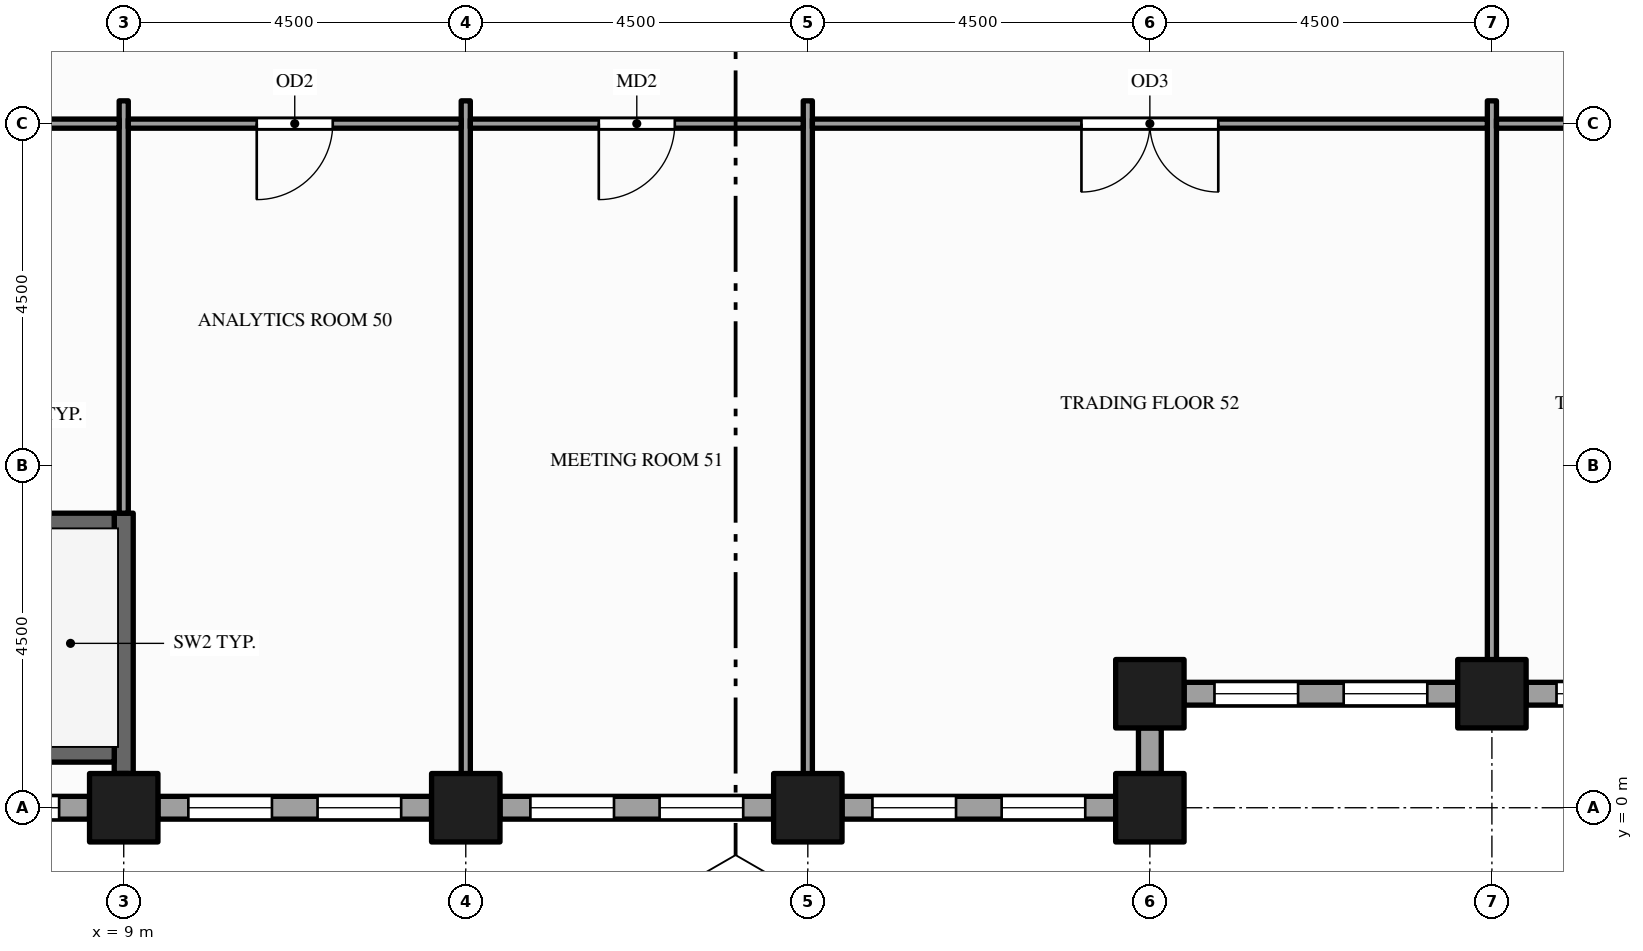
"""IFC4 building model, lengths in metres.
Left out: names, types, materials, properties, quantities, classifications, styles, units other than length and angle.
Written with IfcOpenShell. Run it as: python <this file> out.ifc"""

import sys

from ifc_helpers import new_model, si_unit, direction, frame, frame_2d, origin, origin_2d, place, context, subcontext, project, spatial, rectangle, hollow_rectangle, extrude, element, fill, save


model = new_model("IFC4")
c1 = context("Model", 3, precision=1e-05, world=origin(), true_north=direction((0.0, 1.0)))
c2 = subcontext(c1, "Body", "Model", "MODEL_VIEW")
j1 = project(units=[si_unit("LENGTHUNIT", "METRE"), si_unit("PLANEANGLEUNIT", "RADIAN")], contexts=[c1])
p1 = place(None, origin())
s1 = spatial("IfcSite", under=j1, at=p1, CompositionType="ELEMENT")
p2 = place(p1, origin())
s2 = spatial("IfcBuilding", under=s1, at=p2, CompositionType="ELEMENT")
p3 = place(p2, frame((0.0, 0.0, 143.0)))
s3 = spatial("IfcBuildingStorey", under=s2, at=p3, CompositionType="ELEMENT", Elevation=143.0)
for number, where, z_axis, x_axis in (
    (1, (9.0, 0.0, -0.15), (0.0, 0.0, 1.0), (1.0, 0.0, 0.0)),
    (2, (13.5, 0.0, -0.15), (0.0, 0.0, 1.0), (1.0, 0.0, 0.0)),
    (3, (18.0, 0.0, -0.15), (0.0, 0.0, 1.0), (1.0, 0.0, 0.0)),
    (4, (22.5, 0.0, -0.15), (0.0, 0.0, 1.0), (1.0, 0.0, 0.0)),
    (5, (22.5, 1.5, -0.15), (0.0, 0.0, 1.0), (1.0, 0.0, 0.0)),
    (6, (27.0, 1.5, -0.15), (0.0, 0.0, 1.0), (1.0, 0.0, 0.0)),
):
    element("IfcColumn", number, at=place(p3, frame(where, z_axis=z_axis, x_axis=x_axis)), inside=s3, PredefinedType="COLUMN", context=c2, shape_type="SweptSolid", body=[
        extrude(hollow_rectangle(XDim=0.9, YDim=0.9, WallThickness=0.045, at=origin_2d()), origin(), (0.0, 0.0, 1.0), 4.0),
    ])
p4 = place(p3, frame((4.95, 0.0, 0.0), z_axis=(0.0, 0.0, 1.0), x_axis=(1.0, 0.0, 0.0)))
e7 = element("IfcWall", 7, at=p4, inside=s3, PredefinedType="STANDARD", context=c2, shape_type="SweptSolid", body=[
    extrude(rectangle(XDim=3.6, YDim=0.3, at=frame_2d((1.8, 0.0))), origin(), (0.0, 0.0, 1.0), 3.149),
])
p5 = place(p4, frame((0.4, 0.0, 0.9)))
e8 = element("IfcOpeningElement", 8, at=p5, cuts=e7, PredefinedType="OPENING", context=c2, shape_type="SweptSolid", body=[
    extrude(rectangle(XDim=1.1, YDim=2.0, at=frame_2d((0.55, 1.0))), frame((0.0, 0.16, 0.0), z_axis=(0.0, -1.0, 0.0), x_axis=(1.0, 0.0, 0.0)), (0.0, 0.0, 1.0), 0.32),
])
p6 = place(p4, frame((2.1, 0.0, 0.9)))
e9 = element("IfcOpeningElement", 9, at=p6, cuts=e7, PredefinedType="OPENING", context=c2, shape_type="SweptSolid", body=[
    extrude(rectangle(XDim=1.1, YDim=2.0, at=frame_2d((0.55, 1.0))), frame((0.0, 0.16, 0.0), z_axis=(0.0, -1.0, 0.0), x_axis=(1.0, 0.0, 0.0)), (0.0, 0.0, 1.0), 0.32),
])
p7 = place(p3, frame((9.45, 0.0, 0.0), z_axis=(0.0, 0.0, 1.0), x_axis=(1.0, 0.0, 0.0)))
e10 = element("IfcWall", 10, at=p7, inside=s3, PredefinedType="STANDARD", context=c2, shape_type="SweptSolid", body=[
    extrude(rectangle(XDim=3.6, YDim=0.3, at=frame_2d((1.8, 0.0))), origin(), (0.0, 0.0, 1.0), 2.87),
])
p8 = place(p7, frame((0.4, 0.0, 0.9)))
e11 = element("IfcOpeningElement", 11, at=p8, cuts=e10, PredefinedType="OPENING", context=c2, shape_type="SweptSolid", body=[
    extrude(rectangle(XDim=1.1, YDim=1.75, at=frame_2d((0.55, 0.875))), frame((0.0, 0.16, 0.0), z_axis=(0.0, -1.0, 0.0), x_axis=(1.0, 0.0, 0.0)), (0.0, 0.0, 1.0), 0.32),
])
p9 = place(p7, frame((2.1, 0.0, 0.9)))
e12 = element("IfcOpeningElement", 12, at=p9, cuts=e10, PredefinedType="OPENING", context=c2, shape_type="SweptSolid", body=[
    extrude(rectangle(XDim=1.1, YDim=1.75, at=frame_2d((0.55, 0.875))), frame((0.0, 0.16, 0.0), z_axis=(0.0, -1.0, 0.0), x_axis=(1.0, 0.0, 0.0)), (0.0, 0.0, 1.0), 0.32),
])
p10 = place(p3, frame((13.95, 0.0, 0.0), z_axis=(0.0, 0.0, 1.0), x_axis=(1.0, 0.0, 0.0)))
e13 = element("IfcWall", 13, at=p10, inside=s3, PredefinedType="STANDARD", context=c2, shape_type="SweptSolid", body=[
    extrude(rectangle(XDim=3.6, YDim=0.3, at=frame_2d((1.8, 0.0))), origin(), (0.0, 0.0, 1.0), 2.87),
])
p11 = place(p10, frame((0.4, 0.0, 0.9)))
e14 = element("IfcOpeningElement", 14, at=p11, cuts=e13, PredefinedType="OPENING", context=c2, shape_type="SweptSolid", body=[
    extrude(rectangle(XDim=1.1, YDim=1.75, at=frame_2d((0.55, 0.875))), frame((0.0, 0.16, 0.0), z_axis=(0.0, -1.0, 0.0), x_axis=(1.0, 0.0, 0.0)), (0.0, 0.0, 1.0), 0.32),
])
p12 = place(p10, frame((2.1, 0.0, 0.9)))
e15 = element("IfcOpeningElement", 15, at=p12, cuts=e13, PredefinedType="OPENING", context=c2, shape_type="SweptSolid", body=[
    extrude(rectangle(XDim=1.1, YDim=1.75, at=frame_2d((0.55, 0.875))), frame((0.0, 0.16, 0.0), z_axis=(0.0, -1.0, 0.0), x_axis=(1.0, 0.0, 0.0)), (0.0, 0.0, 1.0), 0.32),
])
p13 = place(p3, frame((18.45, 0.0, 0.0), z_axis=(0.0, 0.0, 1.0), x_axis=(1.0, 0.0, 0.0)))
e16 = element("IfcWall", 16, at=p13, inside=s3, PredefinedType="STANDARD", context=c2, shape_type="SweptSolid", body=[
    extrude(rectangle(XDim=3.6, YDim=0.3, at=frame_2d((1.8, 0.0))), origin(), (0.0, 0.0, 1.0), 2.87),
])
p14 = place(p13, frame((0.4, 0.0, 0.9)))
e17 = element("IfcOpeningElement", 17, at=p14, cuts=e16, PredefinedType="OPENING", context=c2, shape_type="SweptSolid", body=[
    extrude(rectangle(XDim=1.1, YDim=1.75, at=frame_2d((0.55, 0.875))), frame((0.0, 0.16, 0.0), z_axis=(0.0, -1.0, 0.0), x_axis=(1.0, 0.0, 0.0)), (0.0, 0.0, 1.0), 0.32),
])
p15 = place(p13, frame((2.1, 0.0, 0.9)))
e18 = element("IfcOpeningElement", 18, at=p15, cuts=e16, PredefinedType="OPENING", context=c2, shape_type="SweptSolid", body=[
    extrude(rectangle(XDim=1.1, YDim=1.75, at=frame_2d((0.55, 0.875))), frame((0.0, 0.16, 0.0), z_axis=(0.0, -1.0, 0.0), x_axis=(1.0, 0.0, 0.0)), (0.0, 0.0, 1.0), 0.32),
])
p16 = place(p3, frame((22.5, 0.45, 0.0), z_axis=(0.0, 0.0, 1.0), x_axis=(0.0, 1.0, 0.0)))
e19 = element("IfcWall", 19, at=p16, inside=s3, PredefinedType="STANDARD", context=c2, shape_type="SweptSolid", body=[
    extrude(rectangle(XDim=0.6, YDim=0.3, at=frame_2d((0.3, 0.0))), origin(), (0.0, 0.0, 1.0), 3.149),
])
p17 = place(p3, frame((22.95, 1.5, 0.0), z_axis=(0.0, 0.0, 1.0), x_axis=(1.0, 0.0, 0.0)))
e20 = element("IfcWall", 20, at=p17, inside=s3, PredefinedType="STANDARD", context=c2, shape_type="SweptSolid", body=[
    extrude(rectangle(XDim=3.6, YDim=0.3, at=frame_2d((1.8, 0.0))), origin(), (0.0, 0.0, 1.0), 2.87),
])
p18 = place(p17, frame((0.4, 0.0, 0.9)))
e21 = element("IfcOpeningElement", 21, at=p18, cuts=e20, PredefinedType="OPENING", context=c2, shape_type="SweptSolid", body=[
    extrude(rectangle(XDim=1.1, YDim=1.75, at=frame_2d((0.55, 0.875))), frame((0.0, 0.16, 0.0), z_axis=(0.0, -1.0, 0.0), x_axis=(1.0, 0.0, 0.0)), (0.0, 0.0, 1.0), 0.32),
])
p19 = place(p17, frame((2.1, 0.0, 0.9)))
e22 = element("IfcOpeningElement", 22, at=p19, cuts=e20, PredefinedType="OPENING", context=c2, shape_type="SweptSolid", body=[
    extrude(rectangle(XDim=1.1, YDim=1.75, at=frame_2d((0.55, 0.875))), frame((0.0, 0.16, 0.0), z_axis=(0.0, -1.0, 0.0), x_axis=(1.0, 0.0, 0.0)), (0.0, 0.0, 1.0), 0.32),
])
p20 = place(p3, frame((27.45, 1.5, 0.0), z_axis=(0.0, 0.0, 1.0), x_axis=(1.0, 0.0, 0.0)))
e23 = element("IfcWall", 23, at=p20, inside=s3, PredefinedType="STANDARD", context=c2, shape_type="SweptSolid", body=[
    extrude(rectangle(XDim=3.6, YDim=0.3, at=frame_2d((1.8, 0.0))), origin(), (0.0, 0.0, 1.0), 2.87),
])
p21 = place(p20, frame((0.4, 0.0, 0.9)))
e24 = element("IfcOpeningElement", 24, at=p21, cuts=e23, PredefinedType="OPENING", context=c2, shape_type="SweptSolid", body=[
    extrude(rectangle(XDim=1.1, YDim=1.75, at=frame_2d((0.55, 0.875))), frame((0.0, 0.16, 0.0), z_axis=(0.0, -1.0, 0.0), x_axis=(1.0, 0.0, 0.0)), (0.0, 0.0, 1.0), 0.32),
])
p22 = place(p20, frame((2.1, 0.0, 0.9)))
e25 = element("IfcOpeningElement", 25, at=p22, cuts=e23, PredefinedType="OPENING", context=c2, shape_type="SweptSolid", body=[
    extrude(rectangle(XDim=1.1, YDim=1.75, at=frame_2d((0.55, 0.875))), frame((0.0, 0.16, 0.0), z_axis=(0.0, -1.0, 0.0), x_axis=(1.0, 0.0, 0.0)), (0.0, 0.0, 1.0), 0.32),
])
p23 = place(p3, frame((9.0, 0.15, 0.0), z_axis=(0.0, 0.0, 1.0), x_axis=(0.0, 1.0, 0.0)))
e26 = element("IfcWall", 26, at=p23, inside=s3, PredefinedType="PARTITIONING", context=c2, shape_type="SweptSolid", body=[
    extrude(rectangle(XDim=0.3, YDim=0.12, at=frame_2d((0.15, 0.0))), origin(), (0.0, 0.0, 1.0), 3.85),
])
p24 = place(p3, frame((9.0, 0.45, 0.0), z_axis=(0.0, 0.0, 1.0), x_axis=(0.0, 1.0, 0.0)))
e27 = element("IfcWall", 27, at=p24, inside=s3, PredefinedType="SHEAR", context=c2, shape_type="SweptSolid", body=[
    extrude(rectangle(XDim=3.425, YDim=0.25, at=frame_2d((1.712, 0.0))), origin(), (0.0, 0.0, 1.0), 3.85),
])
p25 = place(p3, frame((9.0, 3.875, 0.0), z_axis=(0.0, 0.0, 1.0), x_axis=(0.0, 1.0, 0.0)))
e28 = element("IfcWall", 28, at=p25, inside=s3, PredefinedType="PARTITIONING", context=c2, shape_type="SweptSolid", body=[
    extrude(rectangle(XDim=5.425, YDim=0.12, at=frame_2d((2.712, 0.0))), origin(), (0.0, 0.0, 1.0), 2.87),
])
for number, where, z_axis, x_axis in (
    (29, (13.5, 0.15, 0.0), (0.0, 0.0, 1.0), (0.0, 1.0, 0.0)),
    (30, (18.0, 0.15, 0.0), (0.0, 0.0, 1.0), (0.0, 1.0, 0.0)),
):
    element("IfcWall", number, at=place(p3, frame(where, z_axis=z_axis, x_axis=x_axis)), inside=s3, PredefinedType="PARTITIONING", context=c2, shape_type="SweptSolid", body=[
        extrude(rectangle(XDim=9.15, YDim=0.12, at=frame_2d((4.575, 0.0))), origin(), (0.0, 0.0, 1.0), 2.87),
    ])
p26 = place(p3, frame((27.0, 1.65, 0.0), z_axis=(0.0, 0.0, 1.0), x_axis=(0.0, 1.0, 0.0)))
e31 = element("IfcWall", 31, at=p26, inside=s3, PredefinedType="PARTITIONING", context=c2, shape_type="SweptSolid", body=[
    extrude(rectangle(XDim=7.65, YDim=0.12, at=frame_2d((3.825, 0.0))), origin(), (0.0, 0.0, 1.0), 2.87),
])
p27 = place(p3, frame((0.85, 0.725, 0.0), z_axis=(0.0, 0.0, 1.0), x_axis=(1.0, 0.0, 0.0)))
e32 = element("IfcWall", 32, at=p27, inside=s3, PredefinedType="SHEAR", context=c2, shape_type="SweptSolid", body=[
    extrude(rectangle(XDim=8.025, YDim=0.25, at=frame_2d((4.012, 0.0))), origin(), (0.0, 0.0, 1.0), 3.85),
])
p28 = place(p3, frame((0.85, 3.75, 0.0), z_axis=(0.0, 0.0, 1.0), x_axis=(1.0, 0.0, 0.0)))
e33 = element("IfcWall", 33, at=p28, inside=s3, PredefinedType="SHEAR", context=c2, shape_type="SweptSolid", body=[
    extrude(rectangle(XDim=8.025, YDim=0.25, at=frame_2d((4.012, 0.0))), origin(), (0.0, 0.0, 1.0), 3.85),
])
p29 = place(p28, frame((0.15, 0.0, 0.0)))
e34 = element("IfcOpeningElement", 34, at=p29, cuts=e33, PredefinedType="OPENING", context=c2, shape_type="SweptSolid", body=[
    extrude(rectangle(XDim=1.1, YDim=2.1, at=frame_2d((0.55, 1.05))), frame((0.0, 0.135, 0.0), z_axis=(0.0, -1.0, 0.0), x_axis=(1.0, 0.0, 0.0)), (0.0, 0.0, 1.0), 0.27),
])
p30 = place(p3, frame((0.15, 9.0, 0.0), z_axis=(0.0, 0.0, 1.0), x_axis=(1.0, 0.0, 0.0)))
e35 = element("IfcWall", 35, at=p30, inside=s3, PredefinedType="PARTITIONING", context=c2, shape_type="SweptSolid", body=[
    extrude(rectangle(XDim=8.79, YDim=0.12, at=frame_2d((4.395, 0.0))), origin(), (0.0, 0.0, 1.0), 2.87),
])
p31 = place(p30, frame((3.805, 0.0, 0.0)))
e36 = element("IfcOpeningElement", 36, at=p31, cuts=e35, PredefinedType="OPENING", context=c2, shape_type="SweptSolid", body=[
    extrude(rectangle(XDim=1.2, YDim=2.1, at=frame_2d((0.6, 1.05))), frame((0.0, 0.07, 0.0), z_axis=(0.0, -1.0, 0.0), x_axis=(1.0, 0.0, 0.0)), (0.0, 0.0, 1.0), 0.14),
])
p32 = place(p3, frame((9.06, 9.0, 0.0), z_axis=(0.0, 0.0, 1.0), x_axis=(1.0, 0.0, 0.0)))
e37 = element("IfcWall", 37, at=p32, inside=s3, PredefinedType="PARTITIONING", context=c2, shape_type="SweptSolid", body=[
    extrude(rectangle(XDim=4.38, YDim=0.12, at=frame_2d((2.19, 0.0))), origin(), (0.0, 0.0, 1.0), 2.87),
])
p33 = place(p32, frame((1.69, 0.0, 0.0)))
e38 = element("IfcOpeningElement", 38, at=p33, cuts=e37, PredefinedType="OPENING", context=c2, shape_type="SweptSolid", body=[
    extrude(rectangle(XDim=1.0, YDim=2.1, at=frame_2d((0.5, 1.05))), frame((0.0, 0.07, 0.0), z_axis=(0.0, -1.0, 0.0), x_axis=(1.0, 0.0, 0.0)), (0.0, 0.0, 1.0), 0.14),
])
p34 = place(p3, frame((13.56, 9.0, 0.0), z_axis=(0.0, 0.0, 1.0), x_axis=(1.0, 0.0, 0.0)))
e39 = element("IfcWall", 39, at=p34, inside=s3, PredefinedType="PARTITIONING", context=c2, shape_type="SweptSolid", body=[
    extrude(rectangle(XDim=4.38, YDim=0.12, at=frame_2d((2.19, 0.0))), origin(), (0.0, 0.0, 1.0), 2.87),
])
p35 = place(p34, frame((1.69, 0.0, 0.0)))
e40 = element("IfcOpeningElement", 40, at=p35, cuts=e39, PredefinedType="OPENING", context=c2, shape_type="SweptSolid", body=[
    extrude(rectangle(XDim=1.0, YDim=2.1, at=frame_2d((0.5, 1.05))), frame((0.0, 0.07, 0.0), z_axis=(0.0, -1.0, 0.0), x_axis=(1.0, 0.0, 0.0)), (0.0, 0.0, 1.0), 0.14),
])
p36 = place(p3, frame((18.06, 9.0, 0.0), z_axis=(0.0, 0.0, 1.0), x_axis=(1.0, 0.0, 0.0)))
e41 = element("IfcWall", 41, at=p36, inside=s3, PredefinedType="PARTITIONING", context=c2, shape_type="SweptSolid", body=[
    extrude(rectangle(XDim=8.88, YDim=0.12, at=frame_2d((4.44, 0.0))), origin(), (0.0, 0.0, 1.0), 2.87),
])
p37 = place(p36, frame((3.54, 0.0, 0.0)))
e42 = element("IfcOpeningElement", 42, at=p37, cuts=e41, PredefinedType="OPENING", context=c2, shape_type="SweptSolid", body=[
    extrude(rectangle(XDim=1.8, YDim=2.1, at=frame_2d((0.9, 1.05))), frame((0.0, 0.07, 0.0), z_axis=(0.0, -1.0, 0.0), x_axis=(1.0, 0.0, 0.0)), (0.0, 0.0, 1.0), 0.14),
])
p38 = place(p3, frame((27.06, 9.0, 0.0), z_axis=(0.0, 0.0, 1.0), x_axis=(1.0, 0.0, 0.0)))
e43 = element("IfcWall", 43, at=p38, inside=s3, PredefinedType="PARTITIONING", context=c2, shape_type="SweptSolid", body=[
    extrude(rectangle(XDim=4.29, YDim=0.12, at=frame_2d((2.145, 0.0))), origin(), (0.0, 0.0, 1.0), 2.87),
])
p39 = place(p38, frame((1.635, 0.0, 0.0)))
e44 = element("IfcOpeningElement", 44, at=p39, cuts=e43, PredefinedType="OPENING", context=c2, shape_type="SweptSolid", body=[
    extrude(rectangle(XDim=1.0, YDim=2.1, at=frame_2d((0.5, 1.05))), frame((0.0, 0.07, 0.0), z_axis=(0.0, -1.0, 0.0), x_axis=(1.0, 0.0, 0.0)), (0.0, 0.0, 1.0), 0.14),
])
p40 = place(p6, origin())
e45 = element("IfcWindow", 45, at=p40, inside=s3, PartitioningType="SINGLE_PANEL", PredefinedType="WINDOW", context=c2, shape_type="SweptSolid", body=[
    extrude(rectangle(XDim=1.1, YDim=2.0, at=frame_2d((0.55, 1.0))), frame((0.0, 0.03, 0.0), z_axis=(0.0, -1.0, 0.0), x_axis=(1.0, 0.0, 0.0)), (0.0, 0.0, 1.0), 0.06),
])
fill(e9, e45)
p41 = place(p8, origin())
e46 = element("IfcWindow", 46, at=p41, inside=s3, PartitioningType="SINGLE_PANEL", PredefinedType="WINDOW", context=c2, shape_type="SweptSolid", body=[
    extrude(rectangle(XDim=1.1, YDim=1.75, at=frame_2d((0.55, 0.875))), frame((0.0, 0.03, 0.0), z_axis=(0.0, -1.0, 0.0), x_axis=(1.0, 0.0, 0.0)), (0.0, 0.0, 1.0), 0.06),
])
fill(e11, e46)
p42 = place(p9, origin())
e47 = element("IfcWindow", 47, at=p42, inside=s3, PartitioningType="SINGLE_PANEL", PredefinedType="WINDOW", context=c2, shape_type="SweptSolid", body=[
    extrude(rectangle(XDim=1.1, YDim=1.75, at=frame_2d((0.55, 0.875))), frame((0.0, 0.03, 0.0), z_axis=(0.0, -1.0, 0.0), x_axis=(1.0, 0.0, 0.0)), (0.0, 0.0, 1.0), 0.06),
])
fill(e12, e47)
p43 = place(p11, origin())
e48 = element("IfcWindow", 48, at=p43, inside=s3, PartitioningType="SINGLE_PANEL", PredefinedType="WINDOW", context=c2, shape_type="SweptSolid", body=[
    extrude(rectangle(XDim=1.1, YDim=1.75, at=frame_2d((0.55, 0.875))), frame((0.0, 0.03, 0.0), z_axis=(0.0, -1.0, 0.0), x_axis=(1.0, 0.0, 0.0)), (0.0, 0.0, 1.0), 0.06),
])
fill(e14, e48)
p44 = place(p12, origin())
e49 = element("IfcWindow", 49, at=p44, inside=s3, PartitioningType="SINGLE_PANEL", PredefinedType="WINDOW", context=c2, shape_type="SweptSolid", body=[
    extrude(rectangle(XDim=1.1, YDim=1.75, at=frame_2d((0.55, 0.875))), frame((0.0, 0.03, 0.0), z_axis=(0.0, -1.0, 0.0), x_axis=(1.0, 0.0, 0.0)), (0.0, 0.0, 1.0), 0.06),
])
fill(e15, e49)
p45 = place(p14, origin())
e50 = element("IfcWindow", 50, at=p45, inside=s3, PartitioningType="SINGLE_PANEL", PredefinedType="WINDOW", context=c2, shape_type="SweptSolid", body=[
    extrude(rectangle(XDim=1.1, YDim=1.75, at=frame_2d((0.55, 0.875))), frame((0.0, 0.03, 0.0), z_axis=(0.0, -1.0, 0.0), x_axis=(1.0, 0.0, 0.0)), (0.0, 0.0, 1.0), 0.06),
])
fill(e17, e50)
p46 = place(p15, origin())
e51 = element("IfcWindow", 51, at=p46, inside=s3, PartitioningType="SINGLE_PANEL", PredefinedType="WINDOW", context=c2, shape_type="SweptSolid", body=[
    extrude(rectangle(XDim=1.1, YDim=1.75, at=frame_2d((0.55, 0.875))), frame((0.0, 0.03, 0.0), z_axis=(0.0, -1.0, 0.0), x_axis=(1.0, 0.0, 0.0)), (0.0, 0.0, 1.0), 0.06),
])
fill(e18, e51)
p47 = place(p18, origin())
e52 = element("IfcWindow", 52, at=p47, inside=s3, PartitioningType="SINGLE_PANEL", PredefinedType="WINDOW", context=c2, shape_type="SweptSolid", body=[
    extrude(rectangle(XDim=1.1, YDim=1.75, at=frame_2d((0.55, 0.875))), frame((0.0, 0.03, 0.0), z_axis=(0.0, -1.0, 0.0), x_axis=(1.0, 0.0, 0.0)), (0.0, 0.0, 1.0), 0.06),
])
fill(e21, e52)
p48 = place(p19, origin())
e53 = element("IfcWindow", 53, at=p48, inside=s3, PartitioningType="SINGLE_PANEL", PredefinedType="WINDOW", context=c2, shape_type="SweptSolid", body=[
    extrude(rectangle(XDim=1.1, YDim=1.75, at=frame_2d((0.55, 0.875))), frame((0.0, 0.03, 0.0), z_axis=(0.0, -1.0, 0.0), x_axis=(1.0, 0.0, 0.0)), (0.0, 0.0, 1.0), 0.06),
])
fill(e22, e53)
p49 = place(p21, origin())
e54 = element("IfcWindow", 54, at=p49, inside=s3, PartitioningType="SINGLE_PANEL", PredefinedType="WINDOW", context=c2, shape_type="SweptSolid", body=[
    extrude(rectangle(XDim=1.1, YDim=1.75, at=frame_2d((0.55, 0.875))), frame((0.0, 0.03, 0.0), z_axis=(0.0, -1.0, 0.0), x_axis=(1.0, 0.0, 0.0)), (0.0, 0.0, 1.0), 0.06),
])
fill(e24, e54)
p50 = place(p33, origin())
e55 = element("IfcDoor", 55, at=p50, inside=s3, OperationType="SINGLE_SWING_LEFT", PredefinedType="DOOR", context=c2, shape_type="SweptSolid", body=[
    extrude(rectangle(XDim=1.0, YDim=2.1, at=frame_2d((0.5, 1.05))), frame((0.0, 0.025, 0.0), z_axis=(0.0, -1.0, 0.0), x_axis=(1.0, 0.0, 0.0)), (0.0, 0.0, 1.0), 0.05),
])
fill(e38, e55)
p51 = place(p35, origin())
e56 = element("IfcDoor", 56, at=p51, inside=s3, OperationType="SINGLE_SWING_LEFT", PredefinedType="DOOR", context=c2, shape_type="SweptSolid", body=[
    extrude(rectangle(XDim=1.0, YDim=2.1, at=frame_2d((0.5, 1.05))), frame((0.0, 0.025, 0.0), z_axis=(0.0, -1.0, 0.0), x_axis=(1.0, 0.0, 0.0)), (0.0, 0.0, 1.0), 0.05),
])
fill(e40, e56)
p52 = place(p37, origin())
e57 = element("IfcDoor", 57, at=p52, inside=s3, OperationType="DOUBLE_DOOR_SINGLE_SWING", PredefinedType="DOOR", context=c2, shape_type="SweptSolid", body=[
    extrude(rectangle(XDim=1.8, YDim=2.1, at=frame_2d((0.9, 1.05))), frame((0.0, 0.025, 0.0), z_axis=(0.0, -1.0, 0.0), x_axis=(1.0, 0.0, 0.0)), (0.0, 0.0, 1.0), 0.05),
])
fill(e42, e57)
save(model, sys.argv[1])
